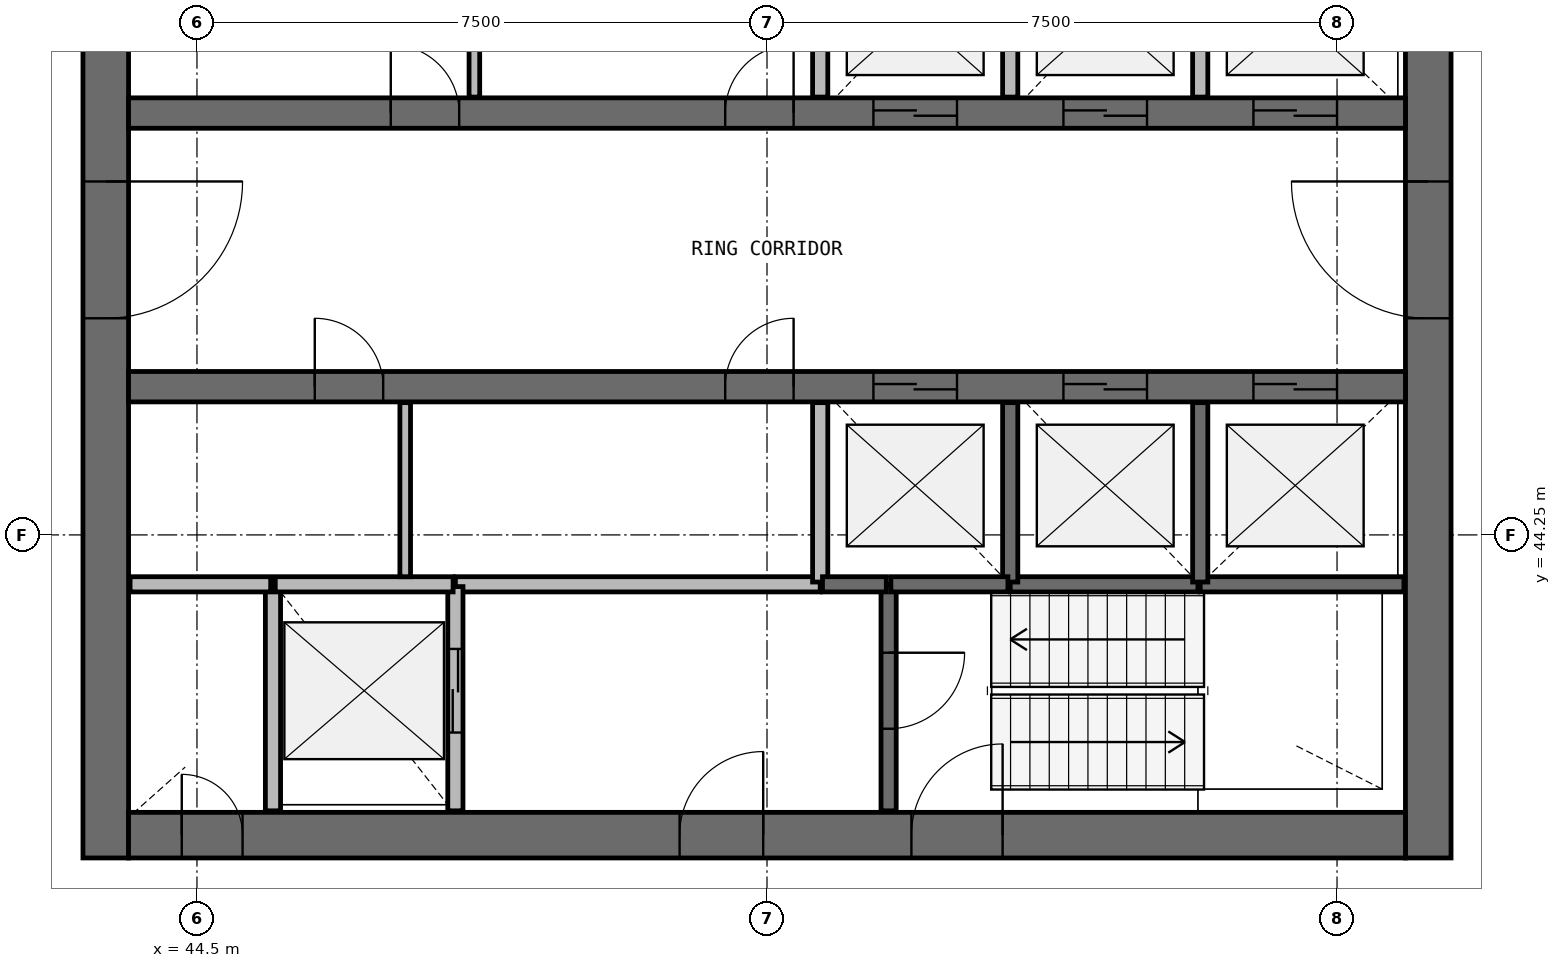
"""IFC4 building model, lengths in metres.
Left out: names, types, materials, properties, quantities, classifications, styles, units other than length and angle.
Written with IfcOpenShell. Run it as: python <this file> out.ifc"""

import sys

from ifc_helpers import new_model, si_unit, direction, frame, frame_2d, origin, place, context, subcontext, project, spatial, rectangle, extrude, source, transform, mapped, element, fill, save


model = new_model("IFC4")
c1 = context("Model", 3, precision=1e-05, world=origin(), true_north=direction((0.0, 1.0)))
c2 = subcontext(c1, "Body", "Model", "MODEL_VIEW")
j1 = project(units=[si_unit("LENGTHUNIT", "METRE"), si_unit("PLANEANGLEUNIT", "RADIAN")], contexts=[c1])
p1 = place(None, origin())
s1 = spatial("IfcSite", under=j1, at=p1, CompositionType="ELEMENT")
p2 = place(p1, origin())
s2 = spatial("IfcBuilding", under=s1, at=p2, CompositionType="ELEMENT")
p3 = place(p2, frame((0.0, 0.0, 246.2)))
s3 = spatial("IfcBuildingStorey", under=s2, at=p3, CompositionType="ELEMENT", Elevation=246.2)
p4 = place(p3, frame((60.7, 40.0, 0.0), z_axis=(0.0, 0.0, 1.0), x_axis=(0.0, 1.0, 0.0)))
e1 = element("IfcWall", 1, at=p4, inside=s3, PredefinedType="SHEAR", context=c2, shape_type="SweptSolid", body=[
    extrude(rectangle(XDim=16.0, YDim=0.6, at=frame_2d((8.0, 0.0))), origin(), (0.0, 0.0, 1.0), 3.9),
])
p5 = place(p4, frame((7.1, 0.0, 0.0)))
e2 = element("IfcOpeningElement", 2, at=p5, cuts=e1, PredefinedType="OPENING", context=c2, shape_type="SweptSolid", body=[
    extrude(rectangle(XDim=1.8, YDim=2.1, at=frame_2d((0.9, 1.05))), frame((0.0, 0.31, 0.0), z_axis=(0.0, -1.0, 0.0), x_axis=(1.0, 0.0, 0.0)), (0.0, 0.0, 1.0), 0.62),
])
p6 = place(p3, frame((43.3, 56.0, 0.0), z_axis=(0.0, 0.0, 1.0), x_axis=(0.0, -1.0, 0.0)))
e3 = element("IfcWall", 3, at=p6, inside=s3, PredefinedType="SHEAR", context=c2, shape_type="SweptSolid", body=[
    extrude(rectangle(XDim=16.0, YDim=0.6, at=frame_2d((8.0, 0.0))), origin(), (0.0, 0.0, 1.0), 3.9),
])
p7 = place(p6, frame((7.1, 0.0, 0.0)))
e4 = element("IfcOpeningElement", 4, at=p7, cuts=e3, PredefinedType="OPENING", context=c2, shape_type="SweptSolid", body=[
    extrude(rectangle(XDim=1.8, YDim=2.1, at=frame_2d((0.9, 1.05))), frame((0.0, 0.31, 0.0), z_axis=(0.0, -1.0, 0.0), x_axis=(1.0, 0.0, 0.0)), (0.0, 0.0, 1.0), 0.62),
])
p8 = place(p3, frame((43.6, 40.3, 0.0), z_axis=(0.0, 0.0, 1.0), x_axis=(1.0, 0.0, 0.0)))
e5 = element("IfcWall", 5, at=p8, inside=s3, PredefinedType="SHEAR", context=c2, shape_type="SweptSolid", body=[
    extrude(rectangle(XDim=16.8, YDim=0.6, at=frame_2d((8.4, 0.0))), origin(), (0.0, 0.0, 1.0), 3.9),
])
p9 = place(p8, frame((10.3, 0.0, 0.0)))
e6 = element("IfcOpeningElement", 6, at=p9, cuts=e5, PredefinedType="OPENING", context=c2, shape_type="SweptSolid", body=[
    extrude(rectangle(XDim=1.2, YDim=2.1, at=frame_2d((0.6, 1.05))), frame((0.0, 0.31, 0.0), z_axis=(0.0, -1.0, 0.0), x_axis=(1.0, 0.0, 0.0)), (0.0, 0.0, 1.0), 0.62),
])
p10 = place(p8, frame((7.25, 0.0, 0.0)))
e7 = element("IfcOpeningElement", 7, at=p10, cuts=e5, PredefinedType="OPENING", context=c2, shape_type="SweptSolid", body=[
    extrude(rectangle(XDim=1.1, YDim=2.1, at=frame_2d((0.55, 1.05))), frame((0.0, 0.31, 0.0), z_axis=(0.0, -1.0, 0.0), x_axis=(1.0, 0.0, 0.0)), (0.0, 0.0, 1.0), 0.62),
])
p11 = place(p8, frame((0.7, 0.0, 0.0)))
e8 = element("IfcOpeningElement", 8, at=p11, cuts=e5, PredefinedType="OPENING", context=c2, shape_type="SweptSolid", body=[
    extrude(rectangle(XDim=0.8, YDim=2.1, at=frame_2d((0.4, 1.05))), frame((0.0, 0.31, 0.0), z_axis=(0.0, -1.0, 0.0), x_axis=(1.0, 0.0, 0.0)), (0.0, 0.0, 1.0), 0.62),
])
p12 = place(p3, frame((43.6, 49.8, 0.0), z_axis=(0.0, 0.0, 1.0), x_axis=(1.0, 0.0, 0.0)))
e9 = element("IfcWall", 9, at=p12, inside=s3, PredefinedType="SHEAR", context=c2, shape_type="SweptSolid", body=[
    extrude(rectangle(XDim=16.8, YDim=0.4, at=frame_2d((8.4, 0.0))), origin(), (0.0, 0.0, 1.0), 3.9),
])
p13 = place(p12, frame((9.8, 0.0, 0.0)))
e10 = element("IfcOpeningElement", 10, at=p13, cuts=e9, PredefinedType="OPENING", context=c2, shape_type="SweptSolid", body=[
    extrude(rectangle(XDim=1.1, YDim=2.1, at=frame_2d((0.55, 1.05))), frame((0.0, 0.21, 0.0), z_axis=(0.0, -1.0, 0.0), x_axis=(1.0, 0.0, 0.0)), (0.0, 0.0, 1.0), 0.42),
])
p14 = place(p12, frame((12.3, 0.0, 0.0)))
e11 = element("IfcOpeningElement", 11, at=p14, cuts=e9, PredefinedType="OPENING", context=c2, shape_type="SweptSolid", body=[
    extrude(rectangle(XDim=1.1, YDim=2.1, at=frame_2d((0.55, 1.05))), frame((0.0, 0.21, 0.0), z_axis=(0.0, -1.0, 0.0), x_axis=(1.0, 0.0, 0.0)), (0.0, 0.0, 1.0), 0.42),
])
p15 = place(p12, frame((14.8, 0.0, 0.0)))
e12 = element("IfcOpeningElement", 12, at=p15, cuts=e9, PredefinedType="OPENING", context=c2, shape_type="SweptSolid", body=[
    extrude(rectangle(XDim=1.1, YDim=2.1, at=frame_2d((0.55, 1.05))), frame((0.0, 0.21, 0.0), z_axis=(0.0, -1.0, 0.0), x_axis=(1.0, 0.0, 0.0)), (0.0, 0.0, 1.0), 0.42),
])
p16 = place(p12, frame((3.45, 0.0, 0.0)))
e13 = element("IfcOpeningElement", 13, at=p16, cuts=e9, PredefinedType="OPENING", context=c2, shape_type="SweptSolid", body=[
    extrude(rectangle(XDim=0.9, YDim=2.1, at=frame_2d((0.45, 1.05))), frame((0.0, 0.21, 0.0), z_axis=(0.0, -1.0, 0.0), x_axis=(1.0, 0.0, 0.0)), (0.0, 0.0, 1.0), 0.42),
])
p17 = place(p12, frame((7.85, 0.0, 0.0)))
e14 = element("IfcOpeningElement", 14, at=p17, cuts=e9, PredefinedType="OPENING", context=c2, shape_type="SweptSolid", body=[
    extrude(rectangle(XDim=0.9, YDim=2.1, at=frame_2d((0.45, 1.05))), frame((0.0, 0.21, 0.0), z_axis=(0.0, -1.0, 0.0), x_axis=(1.0, 0.0, 0.0)), (0.0, 0.0, 1.0), 0.42),
])
p18 = place(p3, frame((43.6, 46.2, 0.0), z_axis=(0.0, 0.0, 1.0), x_axis=(1.0, 0.0, 0.0)))
e15 = element("IfcWall", 15, at=p18, inside=s3, PredefinedType="SHEAR", context=c2, shape_type="SweptSolid", body=[
    extrude(rectangle(XDim=16.8, YDim=0.4, at=frame_2d((8.4, 0.0))), origin(), (0.0, 0.0, 1.0), 3.9),
])
p19 = place(p18, frame((9.8, 0.0, 0.0)))
e16 = element("IfcOpeningElement", 16, at=p19, cuts=e15, PredefinedType="OPENING", context=c2, shape_type="SweptSolid", body=[
    extrude(rectangle(XDim=1.1, YDim=2.1, at=frame_2d((0.55, 1.05))), frame((0.0, 0.21, 0.0), z_axis=(0.0, -1.0, 0.0), x_axis=(1.0, 0.0, 0.0)), (0.0, 0.0, 1.0), 0.42),
])
p20 = place(p18, frame((12.3, 0.0, 0.0)))
e17 = element("IfcOpeningElement", 17, at=p20, cuts=e15, PredefinedType="OPENING", context=c2, shape_type="SweptSolid", body=[
    extrude(rectangle(XDim=1.1, YDim=2.1, at=frame_2d((0.55, 1.05))), frame((0.0, 0.21, 0.0), z_axis=(0.0, -1.0, 0.0), x_axis=(1.0, 0.0, 0.0)), (0.0, 0.0, 1.0), 0.42),
])
p21 = place(p18, frame((14.8, 0.0, 0.0)))
e18 = element("IfcOpeningElement", 18, at=p21, cuts=e15, PredefinedType="OPENING", context=c2, shape_type="SweptSolid", body=[
    extrude(rectangle(XDim=1.1, YDim=2.1, at=frame_2d((0.55, 1.05))), frame((0.0, 0.21, 0.0), z_axis=(0.0, -1.0, 0.0), x_axis=(1.0, 0.0, 0.0)), (0.0, 0.0, 1.0), 0.42),
])
p22 = place(p18, frame((2.45, 0.0, 0.0)))
e19 = element("IfcOpeningElement", 19, at=p22, cuts=e15, PredefinedType="OPENING", context=c2, shape_type="SweptSolid", body=[
    extrude(rectangle(XDim=0.9, YDim=2.1, at=frame_2d((0.45, 1.05))), frame((0.0, 0.21, 0.0), z_axis=(0.0, -1.0, 0.0), x_axis=(1.0, 0.0, 0.0)), (0.0, 0.0, 1.0), 0.42),
])
p23 = place(p18, frame((7.85, 0.0, 0.0)))
e20 = element("IfcOpeningElement", 20, at=p23, cuts=e15, PredefinedType="OPENING", context=c2, shape_type="SweptSolid", body=[
    extrude(rectangle(XDim=0.9, YDim=2.1, at=frame_2d((0.45, 1.05))), frame((0.0, 0.21, 0.0), z_axis=(0.0, -1.0, 0.0), x_axis=(1.0, 0.0, 0.0)), (0.0, 0.0, 1.0), 0.42),
])
p24 = place(p3, frame((52.7, 43.6, 0.0), z_axis=(0.0, 0.0, 1.0), x_axis=(-1.0, 0.0, 0.0)))
e21 = element("IfcWall", 21, at=p24, inside=s3, PredefinedType="SOLIDWALL", context=c2, shape_type="SweptSolid", body=[
    extrude(rectangle(XDim=4.8, YDim=0.2, at=frame_2d((2.4, 0.0))), origin(), (0.0, 0.0, 1.0), 3.58),
])
p25 = place(p3, frame((45.5, 43.6, 0.0), z_axis=(0.0, 0.0, 1.0), x_axis=(0.0, -1.0, 0.0)))
e22 = element("IfcWall", 22, at=p25, inside=s3, PredefinedType="SOLIDWALL", context=c2, shape_type="SweptSolid", body=[
    extrude(rectangle(XDim=2.98, YDim=0.2, at=frame_2d((1.49, 0.0))), origin(), (0.0, 0.0, 1.0), 3.58),
])
p26 = place(p3, frame((47.9, 40.62, 0.0), z_axis=(0.0, 0.0, 1.0), x_axis=(0.0, 1.0, 0.0)))
e23 = element("IfcWall", 23, at=p26, inside=s3, PredefinedType="SOLIDWALL", context=c2, shape_type="SweptSolid", body=[
    extrude(rectangle(XDim=2.95, YDim=0.2, at=frame_2d((1.475, 0.0))), origin(), (0.0, 0.0, 1.0), 3.58),
])
p27 = place(p26, frame((1.03, 0.0, 0.0)))
e24 = element("IfcOpeningElement", 24, at=p27, cuts=e23, PredefinedType="OPENING", context=c2, shape_type="SweptSolid", body=[
    extrude(rectangle(XDim=1.1, YDim=2.1, at=frame_2d((0.55, 1.05))), frame((0.0, 0.11, 0.0), z_axis=(0.0, -1.0, 0.0), x_axis=(1.0, 0.0, 0.0)), (0.0, 0.0, 1.0), 0.22),
])
p28 = place(p3, frame((53.6, 43.6, 0.0), z_axis=(0.0, 0.0, 1.0), x_axis=(0.0, -1.0, 0.0)))
e25 = element("IfcWall", 25, at=p28, inside=s3, PredefinedType="SOLIDWALL", context=c2, shape_type="SweptSolid", body=[
    extrude(rectangle(XDim=2.98, YDim=0.2, at=frame_2d((1.49, 0.0))), origin(), (0.0, 0.0, 1.0), 3.58),
])
p29 = place(p28, frame((0.9, 0.0, 0.0)))
e26 = element("IfcOpeningElement", 26, at=p29, cuts=e25, PredefinedType="OPENING", context=c2, shape_type="SweptSolid", body=[
    extrude(rectangle(XDim=1.0, YDim=2.1, at=frame_2d((0.5, 1.05))), frame((0.0, 0.11, 0.0), z_axis=(0.0, -1.0, 0.0), x_axis=(1.0, 0.0, 0.0)), (0.0, 0.0, 1.0), 0.22),
])
p30 = place(p3, frame((57.7, 43.6, 0.0), z_axis=(0.0, 0.0, 1.0), x_axis=(1.0, 0.0, 0.0)))
e27 = element("IfcWall", 27, at=p30, inside=s3, PredefinedType="SOLIDWALL", context=c2, shape_type="SweptSolid", body=[
    extrude(rectangle(XDim=2.68, YDim=0.2, at=frame_2d((1.34, 0.0))), origin(), (0.0, 0.0, 1.0), 3.58),
])
p31 = place(p3, frame((55.2, 43.6, 0.0), z_axis=(0.0, 0.0, 1.0), x_axis=(1.0, 0.0, 0.0)))
e28 = element("IfcWall", 28, at=p31, inside=s3, PredefinedType="SOLIDWALL", context=c2, shape_type="SweptSolid", body=[
    extrude(rectangle(XDim=2.47, YDim=0.2, at=frame_2d((1.235, 0.0))), origin(), (0.0, 0.0, 1.0), 3.58),
])
p32 = place(p3, frame((47.87, 43.6, 0.0), z_axis=(0.0, 0.0, 1.0), x_axis=(-1.0, 0.0, 0.0)))
e29 = element("IfcWall", 29, at=p32, inside=s3, PredefinedType="SOLIDWALL", context=c2, shape_type="SweptSolid", body=[
    extrude(rectangle(XDim=2.34, YDim=0.2, at=frame_2d((1.17, 0.0))), origin(), (0.0, 0.0, 1.0), 3.58),
])
for number, where, z_axis, x_axis in (
    (30, (52.7, 45.99, 0.0), (0.0, 0.0, 1.0), (0.0, -1.0, 0.0)),
    (31, (52.7, 52.37, 0.0), (0.0, 0.0, 1.0), (0.0, -1.0, 0.0)),
    (32, (55.2, 43.63, 0.0), (0.0, 0.0, 1.0), (0.0, 1.0, 0.0)),
    (33, (55.2, 50.01, 0.0), (0.0, 0.0, 1.0), (0.0, 1.0, 0.0)),
    (34, (57.7, 43.63, 0.0), (0.0, 0.0, 1.0), (0.0, 1.0, 0.0)),
):
    element("IfcWall", number, at=place(p3, frame(where, z_axis=z_axis, x_axis=x_axis)), inside=s3, PredefinedType="SOLIDWALL", context=c2, shape_type="SweptSolid", body=[
        extrude(rectangle(XDim=2.36, YDim=0.2, at=frame_2d((1.18, 0.0))), origin(), (0.0, 0.0, 1.0), 3.58),
    ])
p33 = place(p3, frame((57.7, 50.01, 0.0), z_axis=(0.0, 0.0, 1.0), x_axis=(0.0, 1.0, 0.0)))
e35 = element("IfcWall", 35, at=p33, inside=s3, PredefinedType="SOLIDWALL", context=c2, shape_type="SweptSolid", body=[
    extrude(rectangle(XDim=2.39, YDim=0.2, at=frame_2d((1.195, 0.0))), origin(), (0.0, 0.0, 1.0), 3.58),
])
p34 = place(p3, frame((45.47, 43.6, 0.0), z_axis=(0.0, 0.0, 1.0), x_axis=(-1.0, 0.0, 0.0)))
e36 = element("IfcWall", 36, at=p34, inside=s3, PredefinedType="SOLIDWALL", context=c2, shape_type="SweptSolid", body=[
    extrude(rectangle(XDim=1.85, YDim=0.2, at=frame_2d((0.925, 0.0))), origin(), (0.0, 0.0, 1.0), 3.58),
])
p35 = place(p3, frame((53.63, 43.6, 0.0), z_axis=(0.0, 0.0, 1.0), x_axis=(1.0, 0.0, 0.0)))
e37 = element("IfcWall", 37, at=p35, inside=s3, PredefinedType="SOLIDWALL", context=c2, shape_type="SweptSolid", body=[
    extrude(rectangle(XDim=1.54, YDim=0.2, at=frame_2d((0.77, 0.0))), origin(), (0.0, 0.0, 1.0), 3.58),
])
p36 = place(p3, frame((52.73, 43.6, 0.0), z_axis=(0.0, 0.0, 1.0), x_axis=(1.0, 0.0, 0.0)))
e38 = element("IfcWall", 38, at=p36, inside=s3, PredefinedType="SOLIDWALL", context=c2, shape_type="SweptSolid", body=[
    extrude(rectangle(XDim=0.84, YDim=0.2, at=frame_2d((0.42, 0.0))), origin(), (0.0, 0.0, 1.0), 3.58),
])
for number, where, z_axis, x_axis in (
    (39, (47.24, 43.7, 0.0), (0.0, 0.0, 1.0), (0.0, 1.0, 0.0)),
    (40, (48.15, 50.01, 0.0), (0.0, 0.0, 1.0), (0.0, 1.0, 0.0)),
):
    element("IfcWall", number, at=place(p3, frame(where, z_axis=z_axis, x_axis=x_axis)), inside=s3, PredefinedType="PARTITIONING", context=c2, shape_type="SweptSolid", body=[
        extrude(rectangle(XDim=2.29, YDim=0.14, at=frame_2d((1.145, 0.0))), origin(), (0.0, 0.0, 1.0), 2.88),
    ])
m1 = source(origin(), c2, "Body", "SweptSolid", [
    extrude(rectangle(XDim=1.8, YDim=2.1, at=frame_2d((0.9, 1.05))), frame((0.0, 0.025, 0.0), z_axis=(0.0, -1.0, 0.0), x_axis=(1.0, 0.0, 0.0)), (0.0, 0.0, 1.0), 0.05),
])
p37 = place(p7, origin())
e41 = element("IfcDoor", 41, at=p37, inside=s3, OperationType="SINGLE_SWING_LEFT", PredefinedType="DOOR", context=c2, shape_type="MappedRepresentation", body=[
    mapped(m1, transform((0.0, 0.0, 0.0), scale=1.0)),
])
fill(e4, e41)
p38 = place(p5, origin())
e42 = element("IfcDoor", 42, at=p38, inside=s3, OperationType="SINGLE_SWING_RIGHT", PredefinedType="DOOR", context=c2, shape_type="MappedRepresentation", body=[
    mapped(m1, transform((0.0, 0.0, 0.0), scale=1.0)),
])
fill(e2, e42)
m2 = source(origin(), c2, "Body", "SweptSolid", [
    extrude(rectangle(XDim=1.1, YDim=2.1, at=frame_2d((0.55, 1.05))), frame((0.0, 0.025, 0.0), z_axis=(0.0, -1.0, 0.0), x_axis=(1.0, 0.0, 0.0)), (0.0, 0.0, 1.0), 0.05),
])
p39 = place(p13, origin())
e43 = element("IfcDoor", 43, at=p39, inside=s3, OperationType="DOUBLE_DOOR_SLIDING", PredefinedType="USERDEFINED", context=c2, shape_type="MappedRepresentation", body=[
    mapped(m2, transform((0.0, 0.0, 0.0), scale=1.0)),
])
fill(e10, e43)
p40 = place(p14, origin())
e44 = element("IfcDoor", 44, at=p40, inside=s3, OperationType="DOUBLE_DOOR_SLIDING", PredefinedType="USERDEFINED", context=c2, shape_type="MappedRepresentation", body=[
    mapped(m2, transform((0.0, 0.0, 0.0), scale=1.0)),
])
fill(e11, e44)
p41 = place(p15, origin())
e45 = element("IfcDoor", 45, at=p41, inside=s3, OperationType="DOUBLE_DOOR_SLIDING", PredefinedType="USERDEFINED", context=c2, shape_type="MappedRepresentation", body=[
    mapped(m2, transform((0.0, 0.0, 0.0), scale=1.0)),
])
fill(e12, e45)
p42 = place(p19, origin())
e46 = element("IfcDoor", 46, at=p42, inside=s3, OperationType="DOUBLE_DOOR_SLIDING", PredefinedType="USERDEFINED", context=c2, shape_type="MappedRepresentation", body=[
    mapped(m2, transform((0.0, 0.0, 0.0), scale=1.0)),
])
fill(e16, e46)
p43 = place(p20, origin())
e47 = element("IfcDoor", 47, at=p43, inside=s3, OperationType="DOUBLE_DOOR_SLIDING", PredefinedType="USERDEFINED", context=c2, shape_type="MappedRepresentation", body=[
    mapped(m2, transform((0.0, 0.0, 0.0), scale=1.0)),
])
fill(e17, e47)
p44 = place(p21, origin())
e48 = element("IfcDoor", 48, at=p44, inside=s3, OperationType="DOUBLE_DOOR_SLIDING", PredefinedType="USERDEFINED", context=c2, shape_type="MappedRepresentation", body=[
    mapped(m2, transform((0.0, 0.0, 0.0), scale=1.0)),
])
fill(e18, e48)
p45 = place(p27, origin())
e49 = element("IfcDoor", 49, at=p45, inside=s3, OperationType="DOUBLE_DOOR_SLIDING", PredefinedType="USERDEFINED", context=c2, shape_type="MappedRepresentation", body=[
    mapped(m2, transform((0.0, 0.0, 0.0), scale=1.0)),
])
fill(e24, e49)
m3 = source(origin(), c2, "Body", "SweptSolid", [
    extrude(rectangle(XDim=1.2, YDim=2.1, at=frame_2d((0.6, 1.05))), frame((0.0, 0.025, 0.0), z_axis=(0.0, -1.0, 0.0), x_axis=(1.0, 0.0, 0.0)), (0.0, 0.0, 1.0), 0.05),
])
p46 = place(p9, origin())
e50 = element("IfcDoor", 50, at=p46, inside=s3, OperationType="SINGLE_SWING_RIGHT", PredefinedType="DOOR", context=c2, shape_type="MappedRepresentation", body=[
    mapped(m3, transform((0.0, 0.0, 0.0), scale=1.0)),
])
fill(e6, e50)
m4 = source(origin(), c2, "Body", "SweptSolid", [
    extrude(rectangle(XDim=1.0, YDim=2.1, at=frame_2d((0.5, 1.05))), frame((0.0, 0.025, 0.0), z_axis=(0.0, -1.0, 0.0), x_axis=(1.0, 0.0, 0.0)), (0.0, 0.0, 1.0), 0.05),
])
p47 = place(p29, origin())
e51 = element("IfcDoor", 51, at=p47, inside=s3, OperationType="SINGLE_SWING_LEFT", PredefinedType="DOOR", context=c2, shape_type="MappedRepresentation", body=[
    mapped(m4, transform((0.0, 0.0, 0.0), scale=1.0)),
])
fill(e26, e51)
m5 = source(origin(), c2, "Body", "SweptSolid", [
    extrude(rectangle(XDim=1.1, YDim=2.1, at=frame_2d((0.55, 1.05))), frame((0.0, 0.025, 0.0), z_axis=(0.0, -1.0, 0.0), x_axis=(1.0, 0.0, 0.0)), (0.0, 0.0, 1.0), 0.05),
])
p48 = place(p10, origin())
e52 = element("IfcDoor", 52, at=p48, inside=s3, OperationType="SINGLE_SWING_RIGHT", PredefinedType="DOOR", context=c2, shape_type="MappedRepresentation", body=[
    mapped(m5, transform((0.0, 0.0, 0.0), scale=1.0)),
])
fill(e7, e52)
m6 = source(origin(), c2, "Body", "SweptSolid", [
    extrude(rectangle(XDim=0.8, YDim=2.1, at=frame_2d((0.4, 1.05))), frame((0.0, 0.025, 0.0), z_axis=(0.0, -1.0, 0.0), x_axis=(1.0, 0.0, 0.0)), (0.0, 0.0, 1.0), 0.05),
])
p49 = place(p11, origin())
e53 = element("IfcDoor", 53, at=p49, inside=s3, OperationType="SINGLE_SWING_LEFT", PredefinedType="DOOR", context=c2, shape_type="MappedRepresentation", body=[
    mapped(m6, transform((0.0, 0.0, 0.0), scale=1.0)),
])
fill(e8, e53)
m7 = source(origin(), c2, "Body", "SweptSolid", [
    extrude(rectangle(XDim=0.9, YDim=2.1, at=frame_2d((0.45, 1.05))), frame((0.0, 0.025, 0.0), z_axis=(0.0, -1.0, 0.0), x_axis=(1.0, 0.0, 0.0)), (0.0, 0.0, 1.0), 0.05),
])
p50 = place(p16, origin())
e54 = element("IfcDoor", 54, at=p50, inside=s3, OperationType="SINGLE_SWING_LEFT", PredefinedType="DOOR", context=c2, shape_type="MappedRepresentation", body=[
    mapped(m7, transform((0.0, 0.0, 0.0), scale=1.0)),
])
fill(e13, e54)
p51 = place(p17, origin())
e55 = element("IfcDoor", 55, at=p51, inside=s3, OperationType="SINGLE_SWING_RIGHT", PredefinedType="DOOR", context=c2, shape_type="MappedRepresentation", body=[
    mapped(m7, transform((0.0, 0.0, 0.0), scale=1.0)),
])
fill(e14, e55)
p52 = place(p22, origin())
e56 = element("IfcDoor", 56, at=p52, inside=s3, OperationType="SINGLE_SWING_LEFT", PredefinedType="DOOR", context=c2, shape_type="MappedRepresentation", body=[
    mapped(m7, transform((0.0, 0.0, 0.0), scale=1.0)),
])
fill(e19, e56)
p53 = place(p23, origin())
e57 = element("IfcDoor", 57, at=p53, inside=s3, OperationType="SINGLE_SWING_RIGHT", PredefinedType="DOOR", context=c2, shape_type="MappedRepresentation", body=[
    mapped(m7, transform((0.0, 0.0, 0.0), scale=1.0)),
])
fill(e20, e57)
save(model, sys.argv[1])
